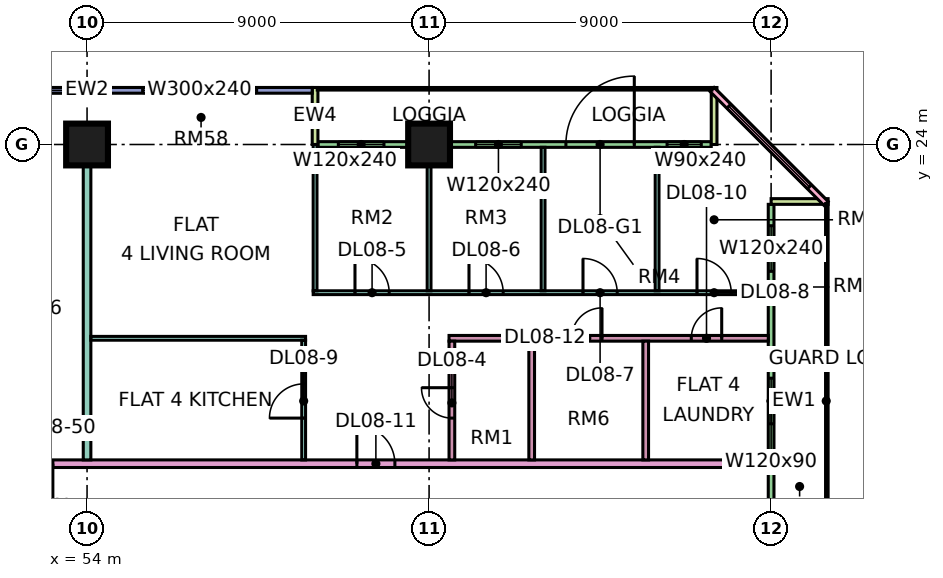
"""IFC4 building model, lengths in metres.
Left out: names, types, materials, properties, quantities, classifications, styles, units other than length and angle.
Written with IfcOpenShell. Run it as: python <this file> out.ifc"""

import sys

from ifc_helpers import new_model, si_unit, direction, frame, frame_2d, origin, origin_2d, place, context, subcontext, project, spatial, rectangle, extrude, element, fill, save


model = new_model("IFC4")
c1 = context("Model", 3, precision=1e-05, world=origin(), true_north=direction((0.0, 1.0)))
c2 = subcontext(c1, "Body", "Model", "MODEL_VIEW")
j1 = project(units=[si_unit("LENGTHUNIT", "METRE"), si_unit("PLANEANGLEUNIT", "RADIAN")], contexts=[c1])
p1 = place(None, origin())
s1 = spatial("IfcSite", under=j1, at=p1, CompositionType="ELEMENT")
p2 = place(p1, origin())
s2 = spatial("IfcBuilding", under=s1, at=p2, CompositionType="ELEMENT")
p3 = place(p2, frame((0.0, 0.0, 45.15)))
s3 = spatial("IfcBuildingStorey", under=s2, at=p3, CompositionType="ELEMENT", Elevation=45.15)
for number, where, z_axis, x_axis in (
    (1, (54.0, 24.0, 0.0), (0.0, 0.0, 1.0), (1.0, 0.0, 0.0)),
    (2, (63.0, 24.0, 0.0), (0.0, 0.0, 1.0), (1.0, 0.0, 0.0)),
):
    element("IfcColumn", number, at=place(p3, frame(where, z_axis=z_axis, x_axis=x_axis)), inside=s3, PredefinedType="COLUMN", context=c2, shape_type="SweptSolid", body=[
        extrude(rectangle(XDim=1.1, YDim=1.1, at=origin_2d()), origin(), (0.0, 0.0, 1.0), 3.75),
    ])
p4 = place(p3, frame((70.425, 24.0, 0.0), z_axis=(0.0, 0.0, 1.0), x_axis=(-1.0, 0.0, 0.0)))
e3 = element("IfcWall", 3, at=p4, inside=s3, PredefinedType="SOLIDWALL", context=c2, shape_type="SweptSolid", body=[
    extrude(rectangle(XDim=10.35, YDim=0.15, at=frame_2d((5.175, 0.0))), origin(), (0.0, 0.0, 1.0), 3.35),
])
p5 = place(p4, frame((0.262, 0.0, 0.45)))
e4 = element("IfcOpeningElement", 4, at=p5, cuts=e3, PredefinedType="OPENING", context=c2, shape_type="SweptSolid", body=[
    extrude(rectangle(XDim=0.9, YDim=2.4, at=frame_2d((0.45, 1.2))), frame((0.0, 0.085, 0.0), z_axis=(0.0, -1.0, 0.0), x_axis=(1.0, 0.0, 0.0)), (0.0, 0.0, 1.0), 0.17),
])
p6 = place(p4, frame((2.025, 0.0, 0.0)))
e5 = element("IfcOpeningElement", 5, at=p6, cuts=e3, PredefinedType="OPENING", context=c2, shape_type="SweptSolid", body=[
    extrude(rectangle(XDim=1.8, YDim=2.4, at=frame_2d((0.9, 1.2))), frame((0.0, 0.085, 0.0), z_axis=(0.0, -1.0, 0.0), x_axis=(1.0, 0.0, 0.0)), (0.0, 0.0, 1.0), 0.17),
])
p7 = place(p4, frame((5.0, 0.0, 0.45)))
e6 = element("IfcOpeningElement", 6, at=p7, cuts=e3, PredefinedType="OPENING", context=c2, shape_type="SweptSolid", body=[
    extrude(rectangle(XDim=1.2, YDim=2.4, at=frame_2d((0.6, 1.2))), frame((0.0, 0.085, 0.0), z_axis=(0.0, -1.0, 0.0), x_axis=(1.0, 0.0, 0.0)), (0.0, 0.0, 1.0), 0.17),
])
p8 = place(p4, frame((8.613, 0.0, 0.45)))
e7 = element("IfcOpeningElement", 7, at=p8, cuts=e3, PredefinedType="OPENING", context=c2, shape_type="SweptSolid", body=[
    extrude(rectangle(XDim=1.2, YDim=2.4, at=frame_2d((0.6, 1.2))), frame((0.0, 0.085, 0.0), z_axis=(0.0, -1.0, 0.0), x_axis=(1.0, 0.0, 0.0)), (0.0, 0.0, 1.0), 0.17),
])
for number, where, z_axis, x_axis in (
    (8, (70.5, 25.5, 0.0), (0.0, 0.0, 1.0), (0.0, -1.0, 0.0)),
    (9, (60.0, 25.5, 0.0), (0.0, 0.0, 1.0), (0.0, -1.0, 0.0)),
):
    element("IfcWall", number, at=place(p3, frame(where, z_axis=z_axis, x_axis=x_axis)), inside=s3, PredefinedType="SOLIDWALL", context=c2, shape_type="SweptSolid", body=[
        extrude(rectangle(XDim=1.5, YDim=0.15, at=frame_2d((0.75, 0.0))), origin(), (0.0, 0.0, 1.0), 3.35),
    ])
p9 = place(p3, frame((59.925, 25.425, 0.0), z_axis=(0.0, 0.0, 1.0), x_axis=(-1.0, 0.0, 0.0)))
e10 = element("IfcWall", 10, at=p9, inside=s3, PredefinedType="SOLIDWALL", context=c2, shape_type="SweptSolid", body=[
    extrude(rectangle(XDim=11.85, YDim=0.15, at=frame_2d((5.925, 0.0))), origin(), (0.0, 0.0, 1.0), 3.35),
])
p10 = place(p9, frame((1.462, 0.0, 0.45)))
e11 = element("IfcOpeningElement", 11, at=p10, cuts=e10, PredefinedType="OPENING", context=c2, shape_type="SweptSolid", body=[
    extrude(rectangle(XDim=3.0, YDim=2.4, at=frame_2d((1.5, 1.2))), frame((0.0, 0.085, 0.0), z_axis=(0.0, -1.0, 0.0), x_axis=(1.0, 0.0, 0.0)), (0.0, 0.0, 1.0), 0.17),
])
p11 = place(p9, frame((6.488, 0.0, 0.45)))
e12 = element("IfcOpeningElement", 12, at=p11, cuts=e10, PredefinedType="OPENING", context=c2, shape_type="SweptSolid", body=[
    extrude(rectangle(XDim=4.8, YDim=2.4, at=frame_2d((2.4, 1.2))), frame((0.0, 0.085, 0.0), z_axis=(0.0, -1.0, 0.0), x_axis=(1.0, 0.0, 0.0)), (0.0, 0.0, 1.0), 0.17),
])
p12 = place(p3, frame((72.0, 12.075, 0.0), z_axis=(0.0, 0.0, 1.0), x_axis=(0.0, 1.0, 0.0)))
e13 = element("IfcWall", 13, at=p12, inside=s3, PredefinedType="SOLIDWALL", context=c2, shape_type="SweptSolid", body=[
    extrude(rectangle(XDim=10.35, YDim=0.15, at=frame_2d((5.175, 0.0))), origin(), (0.0, 0.0, 1.0), 3.35),
])
p13 = place(p12, frame((4.575, 0.0, 1.7)))
e14 = element("IfcOpeningElement", 14, at=p13, cuts=e13, PredefinedType="OPENING", context=c2, shape_type="SweptSolid", body=[
    extrude(rectangle(XDim=1.2, YDim=0.9, at=frame_2d((0.6, 0.45))), frame((0.0, 0.085, 0.0), z_axis=(0.0, -1.0, 0.0), x_axis=(1.0, 0.0, 0.0)), (0.0, 0.0, 1.0), 0.17),
])
p14 = place(p12, frame((8.587, 0.0, 0.45)))
e15 = element("IfcOpeningElement", 15, at=p14, cuts=e13, PredefinedType="OPENING", context=c2, shape_type="SweptSolid", body=[
    extrude(rectangle(XDim=1.2, YDim=2.4, at=frame_2d((0.6, 1.2))), frame((0.0, 0.085, 0.0), z_axis=(0.0, -1.0, 0.0), x_axis=(1.0, 0.0, 0.0)), (0.0, 0.0, 1.0), 0.17),
])
p15 = place(p3, frame((73.5, 22.5, 0.0), z_axis=(0.0, 0.0, 1.0), x_axis=(-1.0, 0.0, 0.0)))
e16 = element("IfcWall", 16, at=p15, inside=s3, PredefinedType="SOLIDWALL", context=c2, shape_type="SweptSolid", body=[
    extrude(rectangle(XDim=1.5, YDim=0.15, at=frame_2d((0.75, 0.0))), origin(), (0.0, 0.0, 1.0), 3.35),
])
p16 = place(p3, frame((73.447, 22.447, 0.0), z_axis=(0.0, 0.0, 1.0), x_axis=(-0.707106781187, 0.707106781187, 0.0)))
e17 = element("IfcWall", 17, at=p16, inside=s3, PredefinedType="SOLIDWALL", context=c2, shape_type="SweptSolid", body=[
    extrude(rectangle(XDim=4.243, YDim=0.15, at=frame_2d((2.121, 0.0))), origin(), (0.0, 0.0, 1.0), 3.35),
])
p17 = place(p16, frame((0.621, 0.0, 0.45)))
e18 = element("IfcOpeningElement", 18, at=p17, cuts=e17, PredefinedType="OPENING", context=c2, shape_type="SweptSolid", body=[
    extrude(rectangle(XDim=3.0, YDim=2.4, at=frame_2d((1.5, 1.2))), frame((0.0, 0.085, 0.0), z_axis=(0.0, -1.0, 0.0), x_axis=(1.0, 0.0, 0.0)), (0.0, 0.0, 1.0), 0.17),
])
p18 = place(p3, frame((51.225, 15.6, 0.0), z_axis=(0.0, 0.0, 1.0), x_axis=(1.0, 0.0, 0.0)))
e19 = element("IfcWall", 19, at=p18, inside=s3, PredefinedType="PARTITIONING", context=c2, shape_type="SweptSolid", body=[
    extrude(rectangle(XDim=20.701, YDim=0.2, at=frame_2d((10.351, 0.0))), origin(), (0.0, 0.0, 1.0), 3.35),
])
p19 = place(p18, frame((9.875, 0.0, 0.0)))
e20 = element("IfcOpeningElement", 20, at=p19, cuts=e19, PredefinedType="OPENING", context=c2, shape_type="SweptSolid", body=[
    extrude(rectangle(XDim=1.0, YDim=2.1, at=frame_2d((0.5, 1.05))), frame((0.0, 0.11, 0.0), z_axis=(0.0, -1.0, 0.0), x_axis=(1.0, 0.0, 0.0)), (0.0, 0.0, 1.0), 0.22),
])
p20 = place(p18, frame((0.875, 0.0, 0.0)))
e21 = element("IfcOpeningElement", 21, at=p20, cuts=e19, PredefinedType="OPENING", context=c2, shape_type="SweptSolid", body=[
    extrude(rectangle(XDim=1.0, YDim=2.1, at=frame_2d((0.5, 1.05))), frame((0.0, 0.11, 0.0), z_axis=(0.0, -1.0, 0.0), x_axis=(1.0, 0.0, 0.0)), (0.0, 0.0, 1.0), 0.22),
])
p21 = place(p3, frame((54.0, 15.7, 0.0), z_axis=(0.0, 0.0, 1.0), x_axis=(0.0, 1.0, 0.0)))
e22 = element("IfcWall", 22, at=p21, inside=s3, PredefinedType="PARTITIONING", context=c2, shape_type="SweptSolid", body=[
    extrude(rectangle(XDim=8.3, YDim=0.2, at=frame_2d((4.15, 0.0))), origin(), (0.0, 0.0, 1.0), 3.35),
])
p22 = place(p3, frame((54.1, 18.9, 0.0), z_axis=(0.0, 0.0, 1.0), x_axis=(1.0, 0.0, 0.0)))
e23 = element("IfcWall", 23, at=p22, inside=s3, PredefinedType="PARTITIONING", context=c2, shape_type="SweptSolid", body=[
    extrude(rectangle(XDim=5.65, YDim=0.1, at=frame_2d((2.825, 0.0))), origin(), (0.0, 0.0, 1.0), 3.35),
])
p23 = place(p3, frame((59.7, 15.7, 0.0), z_axis=(0.0, 0.0, 1.0), x_axis=(0.0, 1.0, 0.0)))
e24 = element("IfcWall", 24, at=p23, inside=s3, PredefinedType="PARTITIONING", context=c2, shape_type="SweptSolid", body=[
    extrude(rectangle(XDim=3.15, YDim=0.1, at=frame_2d((1.575, 0.0))), origin(), (0.0, 0.0, 1.0), 3.35),
])
p24 = place(p23, frame((1.1, 0.0, 0.0)))
e25 = element("IfcOpeningElement", 25, at=p24, cuts=e24, PredefinedType="OPENING", context=c2, shape_type="SweptSolid", body=[
    extrude(rectangle(XDim=0.9, YDim=2.1, at=frame_2d((0.45, 1.05))), frame((0.0, 0.06, 0.0), z_axis=(0.0, -1.0, 0.0), x_axis=(1.0, 0.0, 0.0)), (0.0, 0.0, 1.0), 0.12),
])
p25 = place(p3, frame((59.95, 20.1, 0.0), z_axis=(0.0, 0.0, 1.0), x_axis=(1.0, 0.0, 0.0)))
e26 = element("IfcWall", 26, at=p25, inside=s3, PredefinedType="PARTITIONING", context=c2, shape_type="SweptSolid", body=[
    extrude(rectangle(XDim=11.976, YDim=0.1, at=frame_2d((5.988, 0.0))), origin(), (0.0, 0.0, 1.0), 3.35),
])
p26 = place(p25, frame((1.1, 0.0, 0.0)))
e27 = element("IfcOpeningElement", 27, at=p26, cuts=e26, PredefinedType="OPENING", context=c2, shape_type="SweptSolid", body=[
    extrude(rectangle(XDim=0.9, YDim=2.1, at=frame_2d((0.45, 1.05))), frame((0.0, 0.06, 0.0), z_axis=(0.0, -1.0, 0.0), x_axis=(1.0, 0.0, 0.0)), (0.0, 0.0, 1.0), 0.12),
])
p27 = place(p25, frame((4.1, 0.0, 0.0)))
e28 = element("IfcOpeningElement", 28, at=p27, cuts=e26, PredefinedType="OPENING", context=c2, shape_type="SweptSolid", body=[
    extrude(rectangle(XDim=0.9, YDim=2.1, at=frame_2d((0.45, 1.05))), frame((0.0, 0.06, 0.0), z_axis=(0.0, -1.0, 0.0), x_axis=(1.0, 0.0, 0.0)), (0.0, 0.0, 1.0), 0.12),
])
p28 = place(p25, frame((7.1, 0.0, 0.0)))
e29 = element("IfcOpeningElement", 29, at=p28, cuts=e26, PredefinedType="OPENING", context=c2, shape_type="SweptSolid", body=[
    extrude(rectangle(XDim=0.9, YDim=2.1, at=frame_2d((0.45, 1.05))), frame((0.0, 0.06, 0.0), z_axis=(0.0, -1.0, 0.0), x_axis=(1.0, 0.0, 0.0)), (0.0, 0.0, 1.0), 0.12),
])
p29 = place(p25, frame((10.1, 0.0, 0.0)))
e30 = element("IfcOpeningElement", 30, at=p29, cuts=e26, PredefinedType="OPENING", context=c2, shape_type="SweptSolid", body=[
    extrude(rectangle(XDim=0.9, YDim=2.1, at=frame_2d((0.45, 1.05))), frame((0.0, 0.06, 0.0), z_axis=(0.0, -1.0, 0.0), x_axis=(1.0, 0.0, 0.0)), (0.0, 0.0, 1.0), 0.12),
])
p30 = place(p3, frame((60.0, 20.15, 0.0), z_axis=(0.0, 0.0, 1.0), x_axis=(0.0, 1.0, 0.0)))
e31 = element("IfcWall", 31, at=p30, inside=s3, PredefinedType="PARTITIONING", context=c2, shape_type="SweptSolid", body=[
    extrude(rectangle(XDim=3.85, YDim=0.1, at=frame_2d((1.925, 0.0))), origin(), (0.0, 0.0, 1.0), 3.35),
])
p31 = place(p3, frame((63.0, 20.15, 0.0), z_axis=(0.0, 0.0, 1.0), x_axis=(0.0, 1.0, 0.0)))
e32 = element("IfcWall", 32, at=p31, inside=s3, PredefinedType="PARTITIONING", context=c2, shape_type="SweptSolid", body=[
    extrude(rectangle(XDim=3.776, YDim=0.1, at=frame_2d((1.888, 0.0))), origin(), (0.0, 0.0, 1.0), 3.35),
])
p32 = place(p3, frame((63.525, 18.9, 0.0), z_axis=(0.0, 0.0, 1.0), x_axis=(1.0, 0.0, 0.0)))
e33 = element("IfcWall", 33, at=p32, inside=s3, PredefinedType="PARTITIONING", context=c2, shape_type="SweptSolid", body=[
    extrude(rectangle(XDim=8.401, YDim=0.15, at=frame_2d((4.201, 0.0))), origin(), (0.0, 0.0, 1.0), 3.35),
])
p33 = place(p32, frame((6.375, 0.0, 0.0)))
e34 = element("IfcOpeningElement", 34, at=p33, cuts=e33, PredefinedType="OPENING", context=c2, shape_type="SweptSolid", body=[
    extrude(rectangle(XDim=0.8, YDim=2.1, at=frame_2d((0.4, 1.05))), frame((0.0, 0.085, 0.0), z_axis=(0.0, -1.0, 0.0), x_axis=(1.0, 0.0, 0.0)), (0.0, 0.0, 1.0), 0.17),
])
p34 = place(p32, frame((3.225, 0.0, 0.0)))
e35 = element("IfcOpeningElement", 35, at=p34, cuts=e33, PredefinedType="OPENING", context=c2, shape_type="SweptSolid", body=[
    extrude(rectangle(XDim=0.8, YDim=2.1, at=frame_2d((0.4, 1.05))), frame((0.0, 0.085, 0.0), z_axis=(0.0, -1.0, 0.0), x_axis=(1.0, 0.0, 0.0)), (0.0, 0.0, 1.0), 0.17),
])
p35 = place(p3, frame((63.6, 15.7, 0.0), z_axis=(0.0, 0.0, 1.0), x_axis=(0.0, 1.0, 0.0)))
e36 = element("IfcWall", 36, at=p35, inside=s3, PredefinedType="PARTITIONING", context=c2, shape_type="SweptSolid", body=[
    extrude(rectangle(XDim=3.125, YDim=0.15, at=frame_2d((1.562, 0.0))), origin(), (0.0, 0.0, 1.0), 3.35),
])
p36 = place(p35, frame((1.1, 0.0, 0.0)))
e37 = element("IfcOpeningElement", 37, at=p36, cuts=e36, PredefinedType="OPENING", context=c2, shape_type="SweptSolid", body=[
    extrude(rectangle(XDim=0.8, YDim=2.1, at=frame_2d((0.4, 1.05))), frame((0.0, 0.085, 0.0), z_axis=(0.0, -1.0, 0.0), x_axis=(1.0, 0.0, 0.0)), (0.0, 0.0, 1.0), 0.17),
])
p37 = place(p3, frame((65.7, 15.7, 0.0), z_axis=(0.0, 0.0, 1.0), x_axis=(0.0, 1.0, 0.0)))
e38 = element("IfcWall", 38, at=p37, inside=s3, PredefinedType="PARTITIONING", context=c2, shape_type="SweptSolid", body=[
    extrude(rectangle(XDim=3.125, YDim=0.15, at=frame_2d((1.562, 0.0))), origin(), (0.0, 0.0, 1.0), 3.35),
])
p38 = place(p3, frame((66.0, 20.15, 0.0), z_axis=(0.0, 0.0, 1.0), x_axis=(0.0, 1.0, 0.0)))
e39 = element("IfcWall", 39, at=p38, inside=s3, PredefinedType="PARTITIONING", context=c2, shape_type="SweptSolid", body=[
    extrude(rectangle(XDim=3.776, YDim=0.1, at=frame_2d((1.888, 0.0))), origin(), (0.0, 0.0, 1.0), 3.35),
])
p39 = place(p3, frame((68.7, 15.7, 0.0), z_axis=(0.0, 0.0, 1.0), x_axis=(0.0, 1.0, 0.0)))
e40 = element("IfcWall", 40, at=p39, inside=s3, PredefinedType="PARTITIONING", context=c2, shape_type="SweptSolid", body=[
    extrude(rectangle(XDim=3.125, YDim=0.15, at=frame_2d((1.562, 0.0))), origin(), (0.0, 0.0, 1.0), 3.35),
])
p40 = place(p3, frame((69.0, 20.15, 0.0), z_axis=(0.0, 0.0, 1.0), x_axis=(0.0, 1.0, 0.0)))
e41 = element("IfcWall", 41, at=p40, inside=s3, PredefinedType="PARTITIONING", context=c2, shape_type="SweptSolid", body=[
    extrude(rectangle(XDim=3.776, YDim=0.1, at=frame_2d((1.888, 0.0))), origin(), (0.0, 0.0, 1.0), 3.35),
])
p41 = place(p5, origin())
e42 = element("IfcWindow", 42, at=p41, inside=s3, PartitioningType="SINGLE_PANEL", PredefinedType="WINDOW", context=c2, shape_type="SweptSolid", body=[
    extrude(rectangle(XDim=0.9, YDim=2.4, at=frame_2d((0.45, 1.2))), frame((0.0, 0.03, 0.0), z_axis=(0.0, -1.0, 0.0), x_axis=(1.0, 0.0, 0.0)), (0.0, 0.0, 1.0), 0.06),
])
fill(e4, e42)
p42 = place(p6, frame((1.8, 0.0, 0.0), z_axis=(0.0, 0.0, 1.0), x_axis=(-1.0, 0.0, 0.0)))
e43 = element("IfcDoor", 43, at=p42, inside=s3, OperationType="DOUBLE_DOOR_SINGLE_SWING", PredefinedType="DOOR", context=c2, shape_type="SweptSolid", body=[
    extrude(rectangle(XDim=1.8, YDim=2.4, at=frame_2d((0.9, 1.2))), frame((0.0, 0.025, 0.0), z_axis=(0.0, -1.0, 0.0), x_axis=(1.0, 0.0, 0.0)), (0.0, 0.0, 1.0), 0.05),
])
fill(e5, e43)
p43 = place(p7, origin())
e44 = element("IfcWindow", 44, at=p43, inside=s3, PartitioningType="SINGLE_PANEL", PredefinedType="WINDOW", context=c2, shape_type="SweptSolid", body=[
    extrude(rectangle(XDim=1.2, YDim=2.4, at=frame_2d((0.6, 1.2))), frame((0.0, 0.03, 0.0), z_axis=(0.0, -1.0, 0.0), x_axis=(1.0, 0.0, 0.0)), (0.0, 0.0, 1.0), 0.06),
])
fill(e6, e44)
p44 = place(p8, origin())
e45 = element("IfcWindow", 45, at=p44, inside=s3, PartitioningType="SINGLE_PANEL", PredefinedType="WINDOW", context=c2, shape_type="SweptSolid", body=[
    extrude(rectangle(XDim=1.2, YDim=2.4, at=frame_2d((0.6, 1.2))), frame((0.0, 0.03, 0.0), z_axis=(0.0, -1.0, 0.0), x_axis=(1.0, 0.0, 0.0)), (0.0, 0.0, 1.0), 0.06),
])
fill(e7, e45)
p45 = place(p10, origin())
e46 = element("IfcWindow", 46, at=p45, inside=s3, PartitioningType="SINGLE_PANEL", PredefinedType="WINDOW", context=c2, shape_type="SweptSolid", body=[
    extrude(rectangle(XDim=3.0, YDim=2.4, at=frame_2d((1.5, 1.2))), frame((0.0, 0.03, 0.0), z_axis=(0.0, -1.0, 0.0), x_axis=(1.0, 0.0, 0.0)), (0.0, 0.0, 1.0), 0.06),
])
fill(e11, e46)
p46 = place(p11, origin())
e47 = element("IfcWindow", 47, at=p46, inside=s3, PartitioningType="SINGLE_PANEL", PredefinedType="WINDOW", context=c2, shape_type="SweptSolid", body=[
    extrude(rectangle(XDim=4.8, YDim=2.4, at=frame_2d((2.4, 1.2))), frame((0.0, 0.03, 0.0), z_axis=(0.0, -1.0, 0.0), x_axis=(1.0, 0.0, 0.0)), (0.0, 0.0, 1.0), 0.06),
])
fill(e12, e47)
p47 = place(p13, origin())
e48 = element("IfcWindow", 48, at=p47, inside=s3, PartitioningType="SINGLE_PANEL", PredefinedType="WINDOW", context=c2, shape_type="SweptSolid", body=[
    extrude(rectangle(XDim=1.2, YDim=0.9, at=frame_2d((0.6, 0.45))), frame((0.0, 0.03, 0.0), z_axis=(0.0, -1.0, 0.0), x_axis=(1.0, 0.0, 0.0)), (0.0, 0.0, 1.0), 0.06),
])
fill(e14, e48)
p48 = place(p14, origin())
e49 = element("IfcWindow", 49, at=p48, inside=s3, PartitioningType="SINGLE_PANEL", PredefinedType="WINDOW", context=c2, shape_type="SweptSolid", body=[
    extrude(rectangle(XDim=1.2, YDim=2.4, at=frame_2d((0.6, 1.2))), frame((0.0, 0.03, 0.0), z_axis=(0.0, -1.0, 0.0), x_axis=(1.0, 0.0, 0.0)), (0.0, 0.0, 1.0), 0.06),
])
fill(e15, e49)
p49 = place(p17, origin())
e50 = element("IfcWindow", 50, at=p49, inside=s3, PartitioningType="SINGLE_PANEL", PredefinedType="WINDOW", context=c2, shape_type="SweptSolid", body=[
    extrude(rectangle(XDim=3.0, YDim=2.4, at=frame_2d((1.5, 1.2))), frame((0.0, 0.03, 0.0), z_axis=(0.0, -1.0, 0.0), x_axis=(1.0, 0.0, 0.0)), (0.0, 0.0, 1.0), 0.06),
])
fill(e18, e50)
p50 = place(p36, frame((0.8, 0.0, 0.0), z_axis=(0.0, 0.0, 1.0), x_axis=(-1.0, 0.0, 0.0)))
e51 = element("IfcDoor", 51, at=p50, inside=s3, OperationType="SINGLE_SWING_RIGHT", PredefinedType="DOOR", context=c2, shape_type="SweptSolid", body=[
    extrude(rectangle(XDim=0.8, YDim=2.1, at=frame_2d((0.4, 1.05))), frame((0.0, 0.025, 0.0), z_axis=(0.0, -1.0, 0.0), x_axis=(1.0, 0.0, 0.0)), (0.0, 0.0, 1.0), 0.05),
])
fill(e37, e51)
p51 = place(p26, origin())
e52 = element("IfcDoor", 52, at=p51, inside=s3, OperationType="SINGLE_SWING_LEFT", PredefinedType="DOOR", context=c2, shape_type="SweptSolid", body=[
    extrude(rectangle(XDim=0.9, YDim=2.1, at=frame_2d((0.45, 1.05))), frame((0.0, 0.025, 0.0), z_axis=(0.0, -1.0, 0.0), x_axis=(1.0, 0.0, 0.0)), (0.0, 0.0, 1.0), 0.05),
])
fill(e27, e52)
p52 = place(p27, origin())
e53 = element("IfcDoor", 53, at=p52, inside=s3, OperationType="SINGLE_SWING_LEFT", PredefinedType="DOOR", context=c2, shape_type="SweptSolid", body=[
    extrude(rectangle(XDim=0.9, YDim=2.1, at=frame_2d((0.45, 1.05))), frame((0.0, 0.025, 0.0), z_axis=(0.0, -1.0, 0.0), x_axis=(1.0, 0.0, 0.0)), (0.0, 0.0, 1.0), 0.05),
])
fill(e28, e53)
p53 = place(p28, origin())
e54 = element("IfcDoor", 54, at=p53, inside=s3, OperationType="SINGLE_SWING_LEFT", PredefinedType="DOOR", context=c2, shape_type="SweptSolid", body=[
    extrude(rectangle(XDim=0.9, YDim=2.1, at=frame_2d((0.45, 1.05))), frame((0.0, 0.025, 0.0), z_axis=(0.0, -1.0, 0.0), x_axis=(1.0, 0.0, 0.0)), (0.0, 0.0, 1.0), 0.05),
])
fill(e29, e54)
p54 = place(p29, origin())
e55 = element("IfcDoor", 55, at=p54, inside=s3, OperationType="SINGLE_SWING_LEFT", PredefinedType="DOOR", context=c2, shape_type="SweptSolid", body=[
    extrude(rectangle(XDim=0.9, YDim=2.1, at=frame_2d((0.45, 1.05))), frame((0.0, 0.025, 0.0), z_axis=(0.0, -1.0, 0.0), x_axis=(1.0, 0.0, 0.0)), (0.0, 0.0, 1.0), 0.05),
])
fill(e30, e55)
p55 = place(p24, origin())
e56 = element("IfcDoor", 56, at=p55, inside=s3, OperationType="SINGLE_SWING_LEFT", PredefinedType="DOOR", context=c2, shape_type="SweptSolid", body=[
    extrude(rectangle(XDim=0.9, YDim=2.1, at=frame_2d((0.45, 1.05))), frame((0.0, 0.025, 0.0), z_axis=(0.0, -1.0, 0.0), x_axis=(1.0, 0.0, 0.0)), (0.0, 0.0, 1.0), 0.05),
])
fill(e25, e56)
p56 = place(p33, frame((0.8, 0.0, 0.0), z_axis=(0.0, 0.0, 1.0), x_axis=(-1.0, 0.0, 0.0)))
e57 = element("IfcDoor", 57, at=p56, inside=s3, OperationType="SINGLE_SWING_RIGHT", PredefinedType="DOOR", context=c2, shape_type="SweptSolid", body=[
    extrude(rectangle(XDim=0.8, YDim=2.1, at=frame_2d((0.4, 1.05))), frame((0.0, 0.025, 0.0), z_axis=(0.0, -1.0, 0.0), x_axis=(1.0, 0.0, 0.0)), (0.0, 0.0, 1.0), 0.05),
])
fill(e34, e57)
p57 = place(p19, origin())
e58 = element("IfcDoor", 58, at=p57, inside=s3, OperationType="SINGLE_SWING_LEFT", PredefinedType="DOOR", context=c2, shape_type="SweptSolid", body=[
    extrude(rectangle(XDim=1.0, YDim=2.1, at=frame_2d((0.5, 1.05))), frame((0.0, 0.025, 0.0), z_axis=(0.0, -1.0, 0.0), x_axis=(1.0, 0.0, 0.0)), (0.0, 0.0, 1.0), 0.05),
])
fill(e20, e58)
p58 = place(p34, frame((0.8, 0.0, 0.0), z_axis=(0.0, 0.0, 1.0), x_axis=(-1.0, 0.0, 0.0)))
e59 = element("IfcDoor", 59, at=p58, inside=s3, OperationType="SINGLE_SWING_RIGHT", PredefinedType="DOOR", context=c2, shape_type="SweptSolid", body=[
    extrude(rectangle(XDim=0.8, YDim=2.1, at=frame_2d((0.4, 1.05))), frame((0.0, 0.025, 0.0), z_axis=(0.0, -1.0, 0.0), x_axis=(1.0, 0.0, 0.0)), (0.0, 0.0, 1.0), 0.05),
])
fill(e35, e59)
p59 = place(p20, origin())
e60 = element("IfcDoor", 60, at=p59, inside=s3, OperationType="SINGLE_SWING_RIGHT", PredefinedType="DOOR", context=c2, shape_type="SweptSolid", body=[
    extrude(rectangle(XDim=1.0, YDim=2.1, at=frame_2d((0.5, 1.05))), frame((0.0, 0.025, 0.0), z_axis=(0.0, -1.0, 0.0), x_axis=(1.0, 0.0, 0.0)), (0.0, 0.0, 1.0), 0.05),
])
fill(e21, e60)
save(model, sys.argv[1])
